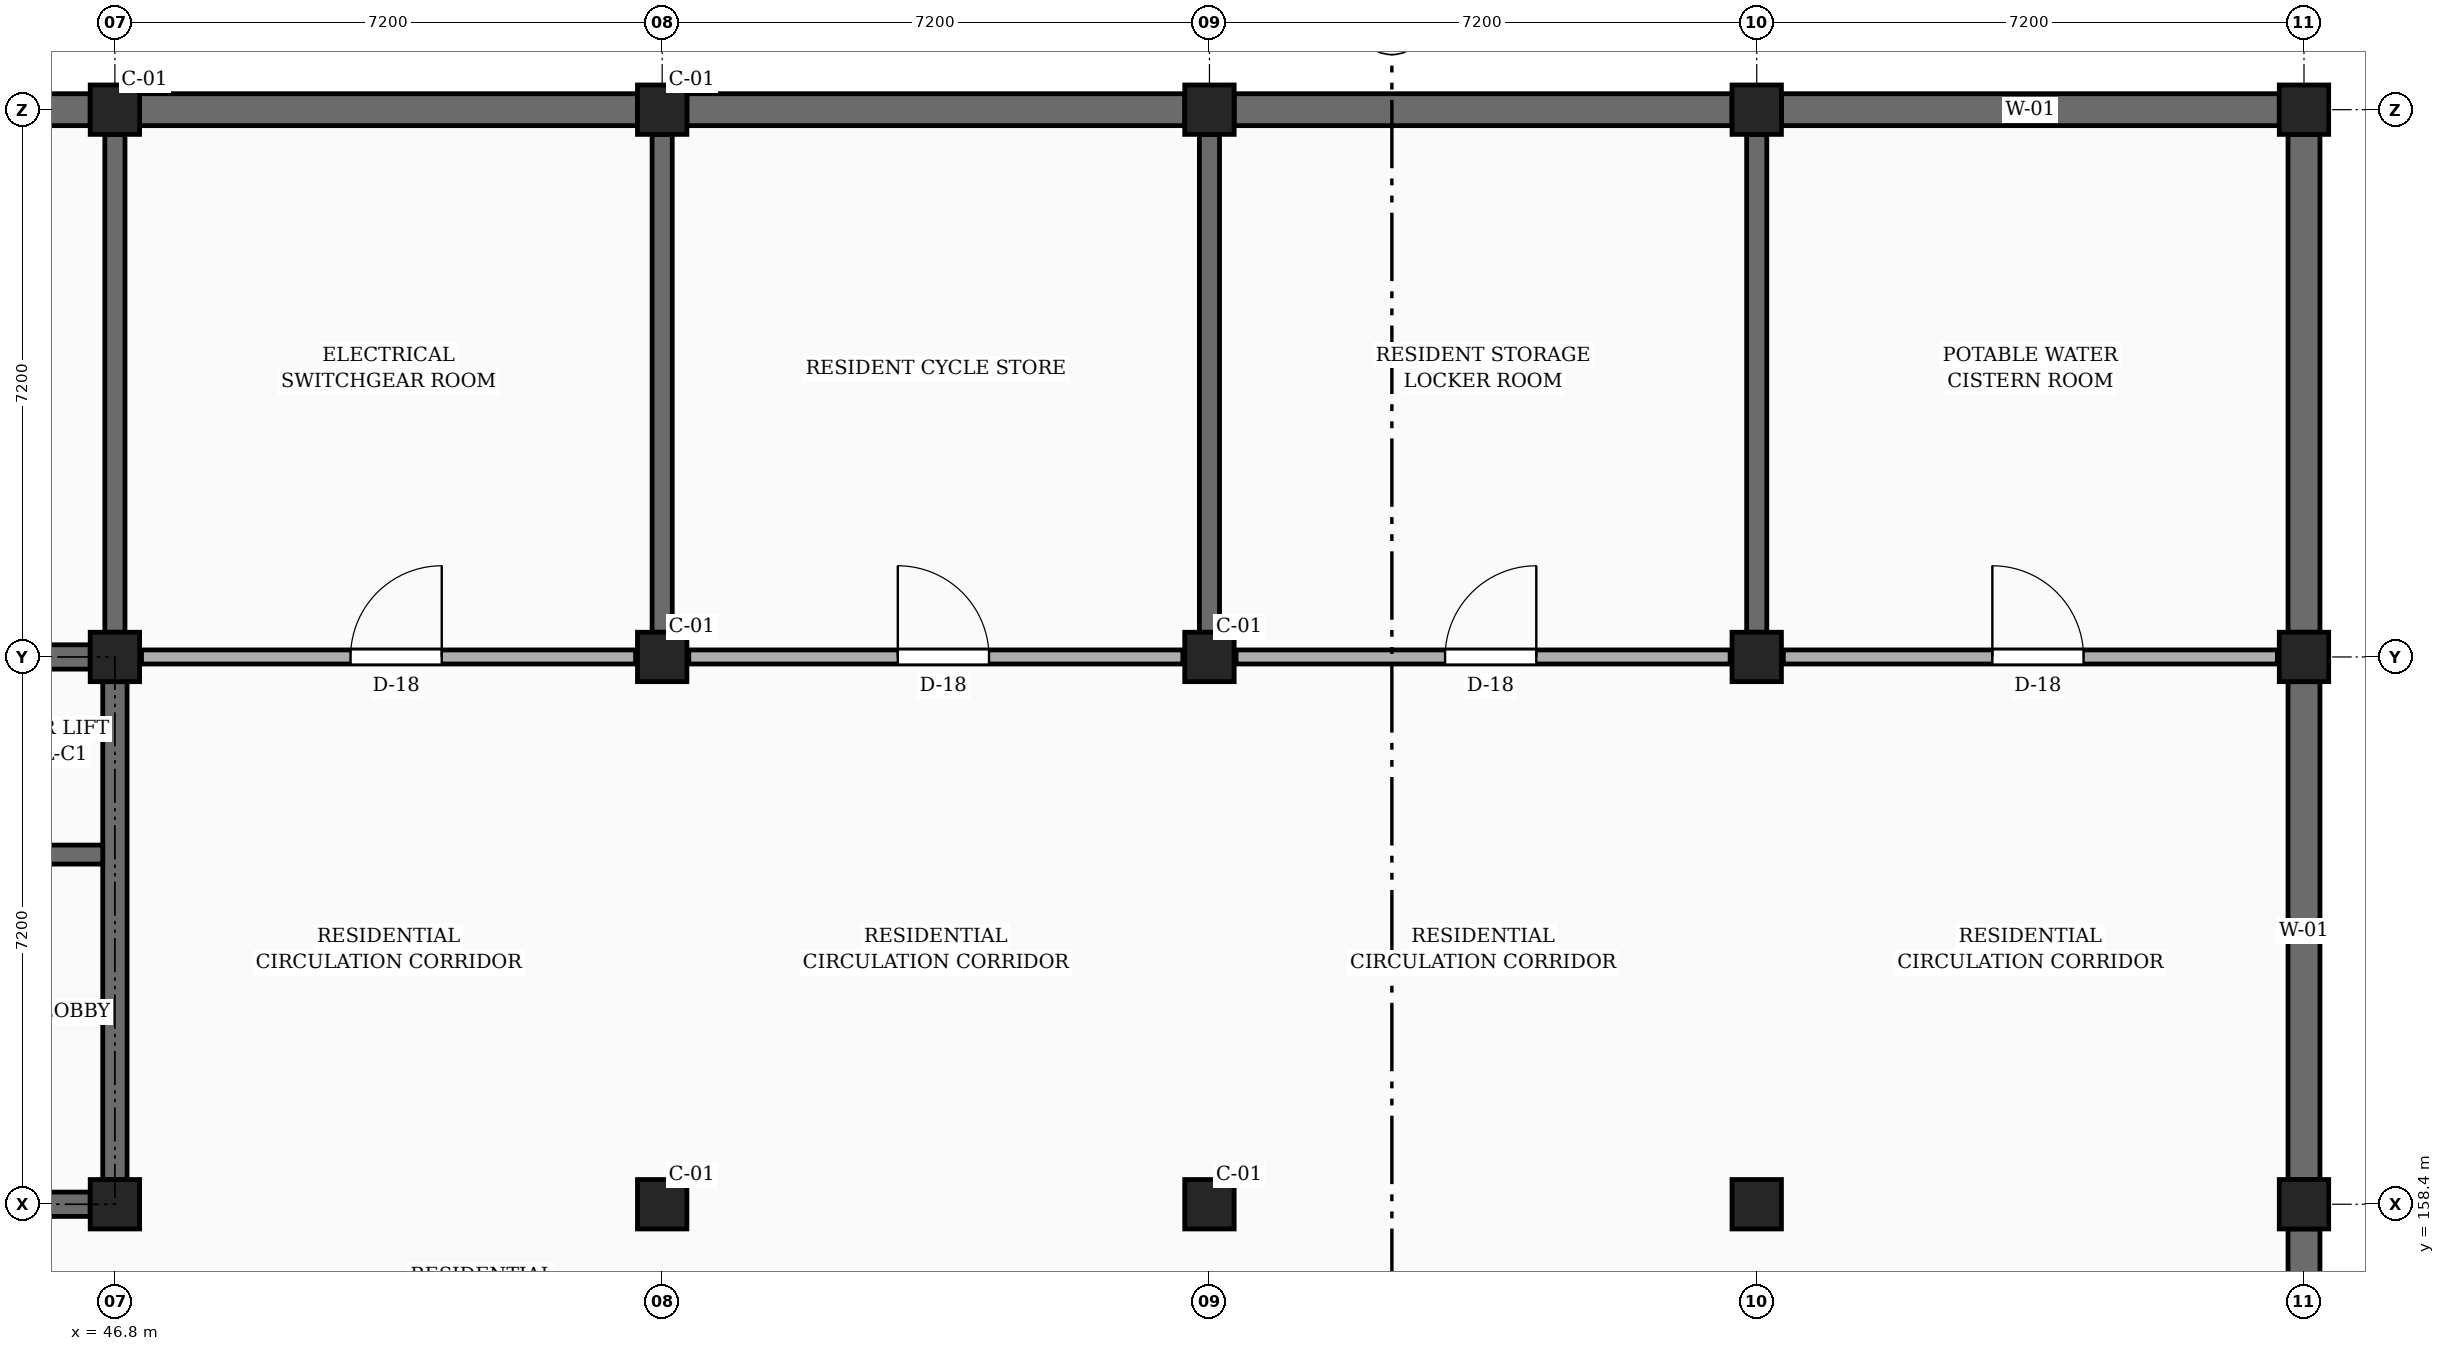
"""IFC4 building model, lengths in metres.
Left out: names, types, materials, properties, quantities, classifications, styles, units other than length and angle.
Written with IfcOpenShell. Run it as: python <this file> out.ifc"""

import sys

from ifc_helpers import new_model, si_unit, direction, frame, frame_2d, origin, origin_2d, place, context, subcontext, project, spatial, rectangle, extrude, element, fill, save


model = new_model("IFC4")
c1 = context("Model", 3, precision=1e-05, world=origin(), true_north=direction((0.0, 1.0)))
c2 = subcontext(c1, "Body", "Model", "MODEL_VIEW")
j1 = project(units=[si_unit("LENGTHUNIT", "METRE"), si_unit("PLANEANGLEUNIT", "RADIAN")], contexts=[c1])
p1 = place(None, origin())
s1 = spatial("IfcSite", under=j1, at=p1, CompositionType="ELEMENT")
p2 = place(p1, origin())
s2 = spatial("IfcBuilding", under=s1, at=p2, CompositionType="ELEMENT")
p3 = place(p2, frame((0.0, 0.0, -4.2)))
s3 = spatial("IfcBuildingStorey", under=s2, at=p3, CompositionType="ELEMENT", Elevation=-4.2)
for number, where, z_axis, x_axis in (
    (1, (46.8, 158.4, 0.0), (0.0, 0.0, 1.0), (1.0, 0.0, 0.0)),
    (2, (46.8, 165.6, 0.0), (0.0, 0.0, 1.0), (1.0, 0.0, 0.0)),
    (3, (46.8, 172.8, 0.0), (0.0, 0.0, 1.0), (1.0, 0.0, 0.0)),
    (4, (54.0, 158.4, 0.0), (0.0, 0.0, 1.0), (1.0, 0.0, 0.0)),
    (5, (54.0, 165.6, 0.0), (0.0, 0.0, 1.0), (1.0, 0.0, 0.0)),
    (6, (54.0, 172.8, 0.0), (0.0, 0.0, 1.0), (1.0, 0.0, 0.0)),
    (7, (61.2, 158.4, 0.0), (0.0, 0.0, 1.0), (1.0, 0.0, 0.0)),
    (8, (61.2, 165.6, 0.0), (0.0, 0.0, 1.0), (1.0, 0.0, 0.0)),
    (9, (61.2, 172.8, 0.0), (0.0, 0.0, 1.0), (1.0, 0.0, 0.0)),
    (10, (68.4, 158.4, 0.0), (0.0, 0.0, 1.0), (1.0, 0.0, 0.0)),
    (11, (68.4, 165.6, 0.0), (0.0, 0.0, 1.0), (1.0, 0.0, 0.0)),
    (12, (68.4, 172.8, 0.0), (0.0, 0.0, 1.0), (1.0, 0.0, 0.0)),
    (13, (75.6, 158.4, 0.0), (0.0, 0.0, 1.0), (1.0, 0.0, 0.0)),
    (14, (75.6, 165.6, 0.0), (0.0, 0.0, 1.0), (1.0, 0.0, 0.0)),
    (15, (75.6, 172.8, 0.0), (0.0, 0.0, 1.0), (1.0, 0.0, 0.0)),
):
    element("IfcColumn", number, at=place(p3, frame(where, z_axis=z_axis, x_axis=x_axis)), inside=s3, PredefinedType="COLUMN", context=c2, shape_type="SweptSolid", body=[
        extrude(rectangle(XDim=0.65, YDim=0.65, at=origin_2d()), origin(), (0.0, 0.0, 1.0), 4.2),
    ])
for number, where, z_axis, x_axis in (
    (16, (46.475, 172.8, 0.0), (0.0, 0.0, 1.0), (-1.0, 0.0, 0.0)),
    (17, (53.675, 172.8, 0.0), (0.0, 0.0, 1.0), (-1.0, 0.0, 0.0)),
    (18, (60.875, 172.8, 0.0), (0.0, 0.0, 1.0), (-1.0, 0.0, 0.0)),
    (19, (68.075, 172.8, 0.0), (0.0, 0.0, 1.0), (-1.0, 0.0, 0.0)),
):
    element("IfcWall", number, at=place(p3, frame(where, z_axis=z_axis, x_axis=x_axis)), inside=s3, PredefinedType="USERDEFINED", context=c2, shape_type="SweptSolid", body=[
        extrude(rectangle(XDim=6.55, YDim=0.42, at=frame_2d((3.275, 0.0))), origin(), (0.0, 0.0, 1.0), 3.03),
    ])
p4 = place(p3, frame((75.275, 172.8, 0.0), z_axis=(0.0, 0.0, 1.0), x_axis=(-1.0, 0.0, 0.0)))
e20 = element("IfcWall", 20, at=p4, inside=s3, PredefinedType="USERDEFINED", context=c2, shape_type="SweptSolid", body=[
    extrude(rectangle(XDim=6.55, YDim=0.42, at=frame_2d((3.275, 0.0))), origin(), (0.0, 0.0, 1.0), 3.03),
])
p5 = place(p3, frame((75.6, 151.525, 0.0), z_axis=(0.0, 0.0, 1.0), x_axis=(0.0, 1.0, 0.0)))
e21 = element("IfcWall", 21, at=p5, inside=s3, PredefinedType="USERDEFINED", context=c2, shape_type="SweptSolid", body=[
    extrude(rectangle(XDim=6.55, YDim=0.42, at=frame_2d((3.275, 0.0))), origin(), (0.0, 0.0, 1.0), 3.03),
])
p6 = place(p3, frame((75.6, 158.725, 0.0), z_axis=(0.0, 0.0, 1.0), x_axis=(0.0, 1.0, 0.0)))
e22 = element("IfcWall", 22, at=p6, inside=s3, PredefinedType="USERDEFINED", context=c2, shape_type="SweptSolid", body=[
    extrude(rectangle(XDim=6.55, YDim=0.42, at=frame_2d((3.275, 0.0))), origin(), (0.0, 0.0, 1.0), 3.03),
])
p7 = place(p3, frame((75.6, 165.925, 0.0), z_axis=(0.0, 0.0, 1.0), x_axis=(0.0, 1.0, 0.0)))
e23 = element("IfcWall", 23, at=p7, inside=s3, PredefinedType="USERDEFINED", context=c2, shape_type="SweptSolid", body=[
    extrude(rectangle(XDim=6.55, YDim=0.42, at=frame_2d((3.275, 0.0))), origin(), (0.0, 0.0, 1.0), 3.03),
])
for number, where, z_axis, x_axis in (
    (24, (46.8, 165.925, 0.0), (0.0, 0.0, 1.0), (0.0, 1.0, 0.0)),
    (25, (54.0, 165.925, 0.0), (0.0, 0.0, 1.0), (0.0, 1.0, 0.0)),
    (26, (61.2, 165.925, 0.0), (0.0, 0.0, 1.0), (0.0, 1.0, 0.0)),
    (27, (68.4, 165.925, 0.0), (0.0, 0.0, 1.0), (0.0, 1.0, 0.0)),
):
    element("IfcWall", number, at=place(p3, frame(where, z_axis=z_axis, x_axis=x_axis)), inside=s3, PredefinedType="SOLIDWALL", context=c2, shape_type="SweptSolid", body=[
        extrude(rectangle(XDim=6.55, YDim=0.265, at=frame_2d((3.275, 0.0))), origin(), (0.0, 0.0, 1.0), 3.18),
    ])
p8 = place(p3, frame((39.925, 165.6, 0.0), z_axis=(0.0, 0.0, 1.0), x_axis=(1.0, 0.0, 0.0)))
e28 = element("IfcWall", 28, at=p8, inside=s3, PredefinedType="SHEAR", context=c2, shape_type="SweptSolid", body=[
    extrude(rectangle(XDim=6.55, YDim=0.32, at=frame_2d((3.275, 0.0))), origin(), (0.0, 0.0, 1.0), 3.88),
])
p9 = place(p3, frame((46.8, 158.725, 0.0), z_axis=(0.0, 0.0, 1.0), x_axis=(0.0, 1.0, 0.0)))
e29 = element("IfcWall", 29, at=p9, inside=s3, PredefinedType="SHEAR", context=c2, shape_type="SweptSolid", body=[
    extrude(rectangle(XDim=6.55, YDim=0.32, at=frame_2d((3.275, 0.0))), origin(), (0.0, 0.0, 1.0), 3.88),
])
p10 = place(p3, frame((39.925, 158.4, 0.0), z_axis=(0.0, 0.0, 1.0), x_axis=(1.0, 0.0, 0.0)))
e30 = element("IfcWall", 30, at=p10, inside=s3, PredefinedType="SHEAR", context=c2, shape_type="SweptSolid", body=[
    extrude(rectangle(XDim=6.55, YDim=0.32, at=frame_2d((3.275, 0.0))), origin(), (0.0, 0.0, 1.0), 3.88),
])
p11 = place(p10, frame((4.425, 0.0, 0.0)))
e31 = element("IfcOpeningElement", 31, at=p11, cuts=e30, PredefinedType="OPENING", context=c2, shape_type="SweptSolid", body=[
    extrude(rectangle(XDim=1.1, YDim=2.15, at=frame_2d((0.55, 1.075))), frame((0.0, 0.17, 0.0), z_axis=(0.0, -1.0, 0.0), x_axis=(1.0, 0.0, 0.0)), (0.0, 0.0, 1.0), 0.34),
])
p12 = place(p3, frame((43.325, 163.0, 0.0), z_axis=(0.0, 0.0, 1.0), x_axis=(1.0, 0.0, 0.0)))
e32 = element("IfcWall", 32, at=p12, inside=s3, PredefinedType="SHEAR", context=c2, shape_type="SweptSolid", body=[
    extrude(rectangle(XDim=3.315, YDim=0.25, at=frame_2d((1.657, 0.0))), origin(), (0.0, 0.0, 1.0), 3.88),
])
p13 = place(p12, frame((1.1, 0.0, 0.0)))
e33 = element("IfcOpeningElement", 33, at=p13, cuts=e32, PredefinedType="OPENING", context=c2, shape_type="SweptSolid", body=[
    extrude(rectangle(XDim=1.0, YDim=2.2, at=frame_2d((0.5, 1.1))), frame((0.0, 0.135, 0.0), z_axis=(0.0, -1.0, 0.0), x_axis=(1.0, 0.0, 0.0)), (0.0, 0.0, 1.0), 0.27),
])
p14 = place(p3, frame((47.15, 165.6, 0.0), z_axis=(0.0, 0.0, 1.0), x_axis=(1.0, 0.0, 0.0)))
e34 = element("IfcWall", 34, at=p14, inside=s3, PredefinedType="PARTITIONING", context=c2, shape_type="SweptSolid", body=[
    extrude(rectangle(XDim=6.5, YDim=0.185, at=frame_2d((3.25, 0.0))), origin(), (0.0, 0.0, 1.0), 3.03),
])
p15 = place(p14, frame((2.75, 0.0, 0.0)))
e35 = element("IfcOpeningElement", 35, at=p15, cuts=e34, PredefinedType="OPENING", context=c2, shape_type="SweptSolid", body=[
    extrude(rectangle(XDim=1.2, YDim=2.2, at=frame_2d((0.6, 1.1))), frame((0.0, 0.103, 0.0), z_axis=(0.0, -1.0, 0.0), x_axis=(1.0, 0.0, 0.0)), (0.0, 0.0, 1.0), 0.205),
])
p16 = place(p3, frame((54.35, 165.6, 0.0), z_axis=(0.0, 0.0, 1.0), x_axis=(1.0, 0.0, 0.0)))
e36 = element("IfcWall", 36, at=p16, inside=s3, PredefinedType="PARTITIONING", context=c2, shape_type="SweptSolid", body=[
    extrude(rectangle(XDim=6.5, YDim=0.185, at=frame_2d((3.25, 0.0))), origin(), (0.0, 0.0, 1.0), 3.03),
])
p17 = place(p16, frame((2.75, 0.0, 0.0)))
e37 = element("IfcOpeningElement", 37, at=p17, cuts=e36, PredefinedType="OPENING", context=c2, shape_type="SweptSolid", body=[
    extrude(rectangle(XDim=1.2, YDim=2.2, at=frame_2d((0.6, 1.1))), frame((0.0, 0.103, 0.0), z_axis=(0.0, -1.0, 0.0), x_axis=(1.0, 0.0, 0.0)), (0.0, 0.0, 1.0), 0.205),
])
p18 = place(p3, frame((61.55, 165.6, 0.0), z_axis=(0.0, 0.0, 1.0), x_axis=(1.0, 0.0, 0.0)))
e38 = element("IfcWall", 38, at=p18, inside=s3, PredefinedType="PARTITIONING", context=c2, shape_type="SweptSolid", body=[
    extrude(rectangle(XDim=6.5, YDim=0.185, at=frame_2d((3.25, 0.0))), origin(), (0.0, 0.0, 1.0), 3.03),
])
p19 = place(p18, frame((2.75, 0.0, 0.0)))
e39 = element("IfcOpeningElement", 39, at=p19, cuts=e38, PredefinedType="OPENING", context=c2, shape_type="SweptSolid", body=[
    extrude(rectangle(XDim=1.2, YDim=2.2, at=frame_2d((0.6, 1.1))), frame((0.0, 0.103, 0.0), z_axis=(0.0, -1.0, 0.0), x_axis=(1.0, 0.0, 0.0)), (0.0, 0.0, 1.0), 0.205),
])
p20 = place(p3, frame((68.75, 165.6, 0.0), z_axis=(0.0, 0.0, 1.0), x_axis=(1.0, 0.0, 0.0)))
e40 = element("IfcWall", 40, at=p20, inside=s3, PredefinedType="PARTITIONING", context=c2, shape_type="SweptSolid", body=[
    extrude(rectangle(XDim=6.5, YDim=0.185, at=frame_2d((3.25, 0.0))), origin(), (0.0, 0.0, 1.0), 3.03),
])
p21 = place(p20, frame((2.75, 0.0, 0.0)))
e41 = element("IfcOpeningElement", 41, at=p21, cuts=e40, PredefinedType="OPENING", context=c2, shape_type="SweptSolid", body=[
    extrude(rectangle(XDim=1.2, YDim=2.2, at=frame_2d((0.6, 1.1))), frame((0.0, 0.103, 0.0), z_axis=(0.0, -1.0, 0.0), x_axis=(1.0, 0.0, 0.0)), (0.0, 0.0, 1.0), 0.205),
])
p22 = place(p15, origin())
e42 = element("IfcDoor", 42, at=p22, inside=s3, OperationType="SINGLE_SWING_RIGHT", PredefinedType="DOOR", context=c2, shape_type="SweptSolid", body=[
    extrude(rectangle(XDim=1.2, YDim=2.2, at=frame_2d((0.6, 1.1))), frame((0.0, 0.025, 0.0), z_axis=(0.0, -1.0, 0.0), x_axis=(1.0, 0.0, 0.0)), (0.0, 0.0, 1.0), 0.05),
])
fill(e35, e42)
p23 = place(p17, origin())
e43 = element("IfcDoor", 43, at=p23, inside=s3, OperationType="SINGLE_SWING_LEFT", PredefinedType="DOOR", context=c2, shape_type="SweptSolid", body=[
    extrude(rectangle(XDim=1.2, YDim=2.2, at=frame_2d((0.6, 1.1))), frame((0.0, 0.025, 0.0), z_axis=(0.0, -1.0, 0.0), x_axis=(1.0, 0.0, 0.0)), (0.0, 0.0, 1.0), 0.05),
])
fill(e37, e43)
p24 = place(p19, origin())
e44 = element("IfcDoor", 44, at=p24, inside=s3, OperationType="SINGLE_SWING_RIGHT", PredefinedType="DOOR", context=c2, shape_type="SweptSolid", body=[
    extrude(rectangle(XDim=1.2, YDim=2.2, at=frame_2d((0.6, 1.1))), frame((0.0, 0.025, 0.0), z_axis=(0.0, -1.0, 0.0), x_axis=(1.0, 0.0, 0.0)), (0.0, 0.0, 1.0), 0.05),
])
fill(e39, e44)
p25 = place(p21, origin())
e45 = element("IfcDoor", 45, at=p25, inside=s3, OperationType="SINGLE_SWING_LEFT", PredefinedType="DOOR", context=c2, shape_type="SweptSolid", body=[
    extrude(rectangle(XDim=1.2, YDim=2.2, at=frame_2d((0.6, 1.1))), frame((0.0, 0.025, 0.0), z_axis=(0.0, -1.0, 0.0), x_axis=(1.0, 0.0, 0.0)), (0.0, 0.0, 1.0), 0.05),
])
fill(e41, e45)
save(model, sys.argv[1])
